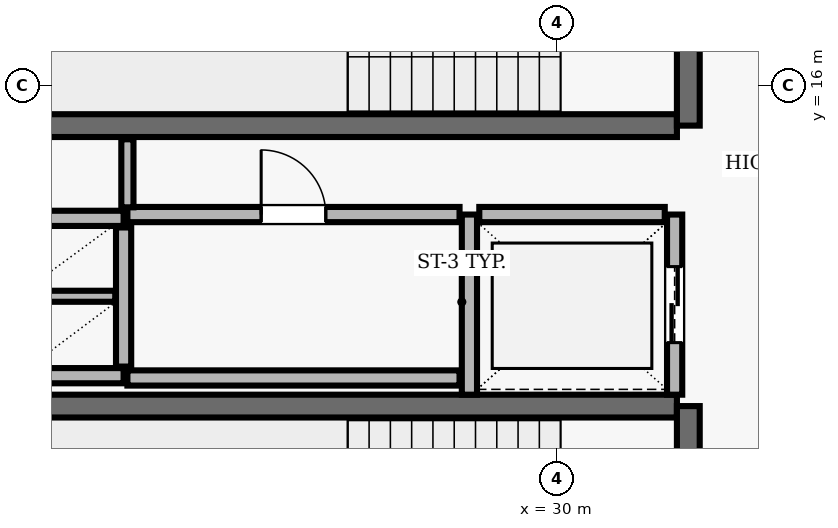
"""IFC4 building model, lengths in metres.
Left out: names, types, materials, properties, quantities, classifications, styles, units other than length and angle.
Written with IfcOpenShell. Run it as: python <this file> out.ifc"""

import sys

from ifc_helpers import new_model, si_unit, direction, frame, frame_2d, origin, place, context, subcontext, project, spatial, rectangle, extrude, element, fill, save


model = new_model("IFC4")
c1 = context("Model", 3, precision=1e-05, world=origin(), true_north=direction((0.0, 1.0)))
c2 = subcontext(c1, "Body", "Model", "MODEL_VIEW")
j1 = project(units=[si_unit("LENGTHUNIT", "METRE"), si_unit("PLANEANGLEUNIT", "RADIAN")], contexts=[c1])
p1 = place(None, origin())
s1 = spatial("IfcSite", under=j1, at=p1, CompositionType="ELEMENT")
p2 = place(p1, origin())
s2 = spatial("IfcBuilding", under=s1, at=p2, CompositionType="ELEMENT")
p3 = place(p2, frame((0.0, 0.0, 191.4)))
s3 = spatial("IfcBuildingStorey", under=s2, at=p3, CompositionType="ELEMENT", Elevation=191.4)
p4 = place(p3, frame((23.22, 15.47, 0.0), z_axis=(0.0, 0.0, 1.0), x_axis=(1.0, 0.0, 0.0)))
e1 = element("IfcWall", 1, at=p4, inside=s3, PredefinedType="SHEAR", context=c2, shape_type="SweptSolid", body=[
    extrude(rectangle(XDim=8.36, YDim=0.3, at=frame_2d((4.18, 0.0))), origin(), (0.0, 0.0, 1.0), 3.69),
])
p5 = place(p3, frame((31.73, 15.47, 0.0), z_axis=(0.0, 0.0, 1.0), x_axis=(0.0, 1.0, 0.0)))
e2 = element("IfcWall", 2, at=p5, inside=s3, PredefinedType="SHEAR", context=c2, shape_type="SweptSolid", body=[
    extrude(rectangle(XDim=3.51, YDim=0.3, at=frame_2d((1.755, 0.0))), origin(), (0.0, 0.0, 1.0), 3.69),
])
p6 = place(p5, frame((1.18, 0.0, 0.0)))
e3 = element("IfcOpeningElement", 3, at=p6, cuts=e2, PredefinedType="OPENING", context=c2, shape_type="SweptSolid", body=[
    extrude(rectangle(XDim=1.15, YDim=2.15, at=frame_2d((0.575, 1.075))), frame((0.0, 0.16, 0.0), z_axis=(0.0, -1.0, 0.0), x_axis=(1.0, 0.0, 0.0)), (0.0, 0.0, 1.0), 0.32),
])
p7 = place(p3, frame((31.58, 11.78, 0.0), z_axis=(0.0, 0.0, 1.0), x_axis=(-1.0, 0.0, 0.0)))
e4 = element("IfcWall", 4, at=p7, inside=s3, PredefinedType="SHEAR", context=c2, shape_type="SweptSolid", body=[
    extrude(rectangle(XDim=8.36, YDim=0.3, at=frame_2d((4.18, 0.0))), origin(), (0.0, 0.0, 1.0), 3.69),
])
p8 = place(p3, frame((31.73, 8.27, 0.0), z_axis=(0.0, 0.0, 1.0), x_axis=(0.0, 1.0, 0.0)))
e5 = element("IfcWall", 5, at=p8, inside=s3, PredefinedType="SHEAR", context=c2, shape_type="SweptSolid", body=[
    extrude(rectangle(XDim=3.51, YDim=0.3, at=frame_2d((1.755, 0.0))), origin(), (0.0, 0.0, 1.0), 3.69),
])
p9 = place(p8, frame((1.18, 0.0, 0.0)))
e6 = element("IfcOpeningElement", 6, at=p9, cuts=e5, PredefinedType="OPENING", context=c2, shape_type="SweptSolid", body=[
    extrude(rectangle(XDim=1.15, YDim=2.15, at=frame_2d((0.575, 1.075))), frame((0.0, 0.16, 0.0), z_axis=(0.0, -1.0, 0.0), x_axis=(1.0, 0.0, 0.0)), (0.0, 0.0, 1.0), 0.32),
])
p10 = place(p3, frame((28.85, 14.3, 0.0), z_axis=(0.0, 0.0, 1.0), x_axis=(0.0, -1.0, 0.0)))
e7 = element("IfcWall", 7, at=p10, inside=s3, PredefinedType="SOLIDWALL", context=c2, shape_type="SweptSolid", body=[
    extrude(rectangle(XDim=2.37, YDim=0.2, at=frame_2d((1.185, 0.0))), origin(), (0.0, 0.0, 1.0), 3.69),
])
p11 = place(p3, frame((31.55, 11.93, 0.0), z_axis=(0.0, 0.0, 1.0), x_axis=(0.0, 1.0, 0.0)))
e8 = element("IfcWall", 8, at=p11, inside=s3, PredefinedType="SOLIDWALL", context=c2, shape_type="SweptSolid", body=[
    extrude(rectangle(XDim=2.37, YDim=0.2, at=frame_2d((1.185, 0.0))), origin(), (0.0, 0.0, 1.0), 3.69),
])
p12 = place(p11, frame((0.685, 0.0, 0.0)))
e9 = element("IfcOpeningElement", 9, at=p12, cuts=e8, PredefinedType="OPENING", context=c2, shape_type="SweptSolid", body=[
    extrude(rectangle(XDim=1.0, YDim=2.1, at=frame_2d((0.5, 1.05))), frame((0.0, 0.11, 0.0), z_axis=(0.0, -1.0, 0.0), x_axis=(1.0, 0.0, 0.0)), (0.0, 0.0, 1.0), 0.22),
])
p13 = place(p3, frame((31.42, 14.3, 0.0), z_axis=(0.0, 0.0, 1.0), x_axis=(-1.0, 0.0, 0.0)))
e10 = element("IfcWall", 10, at=p13, inside=s3, PredefinedType="SOLIDWALL", context=c2, shape_type="SweptSolid", body=[
    extrude(rectangle(XDim=2.44, YDim=0.2, at=frame_2d((1.22, 0.0))), origin(), (0.0, 0.0, 1.0), 3.69),
])
for number, where, z_axis, x_axis in (
    (11, (22.9, 14.25, 0.0), (0.0, 0.0, 1.0), (1.0, 0.0, 0.0)),
    (12, (22.9, 12.18, 0.0), (0.0, 0.0, 1.0), (1.0, 0.0, 0.0)),
):
    element("IfcWall", number, at=place(p3, frame(where, z_axis=z_axis, x_axis=x_axis)), inside=s3, PredefinedType="SOLIDWALL", context=c2, shape_type="SweptSolid", body=[
        extrude(rectangle(XDim=1.4, YDim=0.2, at=frame_2d((0.7, 0.0))), origin(), (0.0, 0.0, 1.0), 3.69),
    ])
p14 = place(p3, frame((24.3, 12.3, 0.0), z_axis=(0.0, 0.0, 1.0), x_axis=(0.0, 1.0, 0.0)))
e13 = element("IfcWall", 13, at=p14, inside=s3, PredefinedType="SOLIDWALL", context=c2, shape_type="SweptSolid", body=[
    extrude(rectangle(XDim=1.83, YDim=0.2, at=frame_2d((0.915, 0.0))), origin(), (0.0, 0.0, 1.0), 3.69),
])
p15 = place(p3, frame((23.01, 13.225, 0.0), z_axis=(0.0, 0.0, 1.0), x_axis=(1.0, 0.0, 0.0)))
e14 = element("IfcWall", 14, at=p15, inside=s3, PredefinedType="PARTITIONING", context=c2, shape_type="SweptSolid", body=[
    extrude(rectangle(XDim=1.18, YDim=0.145, at=frame_2d((0.59, 0.0))), origin(), (0.0, 0.0, 1.0), 3.69),
])
p16 = place(p3, frame((24.35, 12.15, 0.0), z_axis=(0.0, 0.0, 1.0), x_axis=(1.0, 0.0, 0.0)))
e15 = element("IfcWall", 15, at=p16, inside=s3, PredefinedType="SOLIDWALL", context=c2, shape_type="SweptSolid", body=[
    extrude(rectangle(XDim=4.37, YDim=0.2, at=frame_2d((2.185, 0.0))), origin(), (0.0, 0.0, 1.0), 3.69),
])
p17 = place(p3, frame((24.35, 14.3, 0.0), z_axis=(0.0, 0.0, 1.0), x_axis=(1.0, 0.0, 0.0)))
e16 = element("IfcWall", 16, at=p17, inside=s3, PredefinedType="SOLIDWALL", context=c2, shape_type="SweptSolid", body=[
    extrude(rectangle(XDim=4.37, YDim=0.2, at=frame_2d((2.185, 0.0))), origin(), (0.0, 0.0, 1.0), 3.69),
])
p18 = place(p17, frame((1.76, 0.0, 0.0)))
e17 = element("IfcOpeningElement", 17, at=p18, cuts=e16, PredefinedType="OPENING", context=c2, shape_type="SweptSolid", body=[
    extrude(rectangle(XDim=0.85, YDim=2.1, at=frame_2d((0.425, 1.05))), frame((0.0, 0.11, 0.0), z_axis=(0.0, -1.0, 0.0), x_axis=(1.0, 0.0, 0.0)), (0.0, 0.0, 1.0), 0.22),
])
p19 = place(p3, frame((24.35, 15.29, 0.0), z_axis=(0.0, 0.0, 1.0), x_axis=(0.0, -1.0, 0.0)))
e18 = element("IfcWall", 18, at=p19, inside=s3, PredefinedType="PARTITIONING", context=c2, shape_type="SweptSolid", body=[
    extrude(rectangle(XDim=0.895, YDim=0.16, at=frame_2d((0.448, 0.0))), origin(), (0.0, 0.0, 1.0), 3.69),
])
p20 = place(p12, origin())
e19 = element("IfcDoor", 19, at=p20, inside=s3, OperationType="DOUBLE_DOOR_SLIDING", PredefinedType="DOOR", context=c2, shape_type="SweptSolid", body=[
    extrude(rectangle(XDim=1.0, YDim=2.1, at=frame_2d((0.5, 1.05))), frame((0.0, 0.025, 0.0), z_axis=(0.0, -1.0, 0.0), x_axis=(1.0, 0.0, 0.0)), (0.0, 0.0, 1.0), 0.05),
])
fill(e9, e19)
p21 = place(p18, origin())
e20 = element("IfcDoor", 20, at=p21, inside=s3, OperationType="SINGLE_SWING_LEFT", PredefinedType="DOOR", context=c2, shape_type="SweptSolid", body=[
    extrude(rectangle(XDim=0.85, YDim=2.1, at=frame_2d((0.425, 1.05))), frame((0.0, 0.025, 0.0), z_axis=(0.0, -1.0, 0.0), x_axis=(1.0, 0.0, 0.0)), (0.0, 0.0, 1.0), 0.05),
])
fill(e17, e20)
save(model, sys.argv[1])
